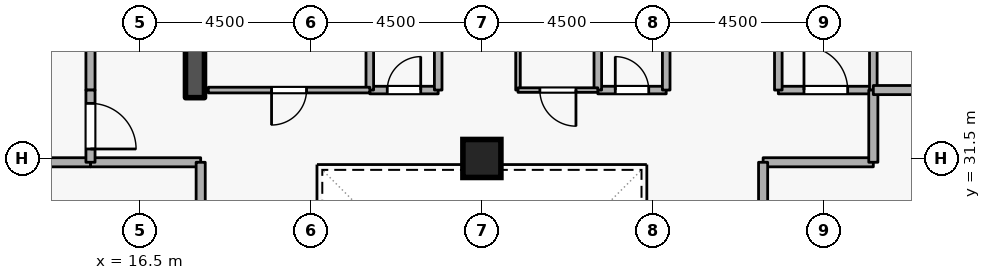
"""IFC4 building model, lengths in metres.
Left out: names, types, materials, properties, quantities, classifications, styles, units other than length and angle.
Written with IfcOpenShell. Run it as: python <this file> out.ifc"""

import sys

from ifc_helpers import new_model, si_unit, direction, frame, frame_2d, origin, origin_2d, place, context, subcontext, project, spatial, rectangle, extrude, element, fill, save


model = new_model("IFC4")
c1 = context("Model", 3, precision=1e-05, world=origin(), true_north=direction((0.0, 1.0)))
c2 = subcontext(c1, "Body", "Model", "MODEL_VIEW")
j1 = project(units=[si_unit("LENGTHUNIT", "METRE"), si_unit("PLANEANGLEUNIT", "RADIAN")], contexts=[c1])
p1 = place(None, origin())
s1 = spatial("IfcSite", under=j1, at=p1, CompositionType="ELEMENT")
p2 = place(p1, origin())
s2 = spatial("IfcBuilding", under=s1, at=p2, CompositionType="ELEMENT")
p3 = place(p2, frame((0.0, 0.0, 221.7)))
s3 = spatial("IfcBuildingStorey", under=s2, at=p3, CompositionType="ELEMENT", Elevation=221.7)
p4 = place(p3, frame((17.95, 33.1, 0.0), z_axis=(0.0, 0.0, 1.0), x_axis=(0.0, 1.0, 0.0)))
e1 = element("IfcWall", 1, at=p4, inside=s3, PredefinedType="SHEAR", context=c2, shape_type="SweptSolid", body=[
    extrude(rectangle(XDim=5.8, YDim=0.5, at=frame_2d((2.9, 0.0))), origin(), (0.0, 0.0, 1.0), 4.2),
])
p5 = place(p3, frame((25.5, 31.5, 0.0), z_axis=(0.0, 0.0, 1.0), x_axis=(1.0, 0.0, 0.0)))
e2 = element("IfcColumn", 2, at=p5, inside=s3, PredefinedType="COLUMN", context=c2, shape_type="SweptSolid", body=[
    extrude(rectangle(XDim=1.0, YDim=1.0, at=origin_2d()), origin(), (0.0, 0.0, 1.0), 4.2),
])
p6 = place(p3, frame((33.3, 33.3, 0.0), z_axis=(0.0, 0.0, 1.0), x_axis=(1.0, 0.0, 0.0)))
e3 = element("IfcWall", 3, at=p6, inside=s3, PredefinedType="STANDARD", context=c2, shape_type="SweptSolid", body=[
    extrude(rectangle(XDim=2.5, YDim=0.2, at=frame_2d((1.25, 0.0))), origin(), (0.0, 0.0, 1.0), 3.94),
])
p7 = place(p6, frame((0.675, 0.0, 0.0)))
e4 = element("IfcOpeningElement", 4, at=p7, cuts=e3, PredefinedType="OPENING", context=c2, shape_type="SweptSolid", body=[
    extrude(rectangle(XDim=1.15, YDim=2.1, at=frame_2d((0.575, 1.05))), frame((0.0, 0.11, 0.0), z_axis=(0.0, -1.0, 0.0), x_axis=(1.0, 0.0, 0.0)), (0.0, 0.0, 1.0), 0.22),
])
p8 = place(p3, frame((35.8, 33.3, 0.0), z_axis=(0.0, 0.0, 1.0), x_axis=(0.0, 1.0, 0.0)))
e5 = element("IfcWall", 5, at=p8, inside=s3, PredefinedType="STANDARD", context=c2, shape_type="SweptSolid", body=[
    extrude(rectangle(XDim=5.7, YDim=0.2, at=frame_2d((2.85, 0.0))), origin(), (0.0, 0.0, 1.0), 3.94),
])
p9 = place(p8, frame((2.275, 0.0, 0.0)))
e6 = element("IfcOpeningElement", 6, at=p9, cuts=e5, PredefinedType="OPENING", context=c2, shape_type="SweptSolid", body=[
    extrude(rectangle(XDim=1.15, YDim=2.1, at=frame_2d((0.575, 1.05))), frame((0.0, 0.11, 0.0), z_axis=(0.0, -1.0, 0.0), x_axis=(1.0, 0.0, 0.0)), (0.0, 0.0, 1.0), 0.22),
])
p10 = place(p3, frame((33.3, 35.6, 0.0), z_axis=(0.0, 0.0, 1.0), x_axis=(0.0, -1.0, 0.0)))
e7 = element("IfcWall", 7, at=p10, inside=s3, PredefinedType="STANDARD", context=c2, shape_type="SweptSolid", body=[
    extrude(rectangle(XDim=2.3, YDim=0.2, at=frame_2d((1.15, 0.0))), origin(), (0.0, 0.0, 1.0), 3.145),
])
p11 = place(p3, frame((22.55, 33.3, 0.0), z_axis=(0.0, 0.0, 1.0), x_axis=(1.0, 0.0, 0.0)))
e8 = element("IfcWall", 8, at=p11, inside=s3, PredefinedType="STANDARD", context=c2, shape_type="SweptSolid", body=[
    extrude(rectangle(XDim=1.8, YDim=0.2, at=frame_2d((0.9, 0.0))), origin(), (0.0, 0.0, 1.0), 3.94),
])
p12 = place(p11, frame((0.46, 0.0, 0.0)))
e9 = element("IfcOpeningElement", 9, at=p12, cuts=e8, PredefinedType="OPENING", context=c2, shape_type="SweptSolid", body=[
    extrude(rectangle(XDim=0.88, YDim=2.04, at=frame_2d((0.44, 1.02))), frame((0.0, 0.11, 0.0), z_axis=(0.0, -1.0, 0.0), x_axis=(1.0, 0.0, 0.0)), (0.0, 0.0, 1.0), 0.22),
])
for number, where, z_axis, x_axis in (
    (10, (24.35, 33.3, 0.0), (0.0, 0.0, 1.0), (0.0, 1.0, 0.0)),
    (11, (22.55, 35.35, 0.0), (0.0, 0.0, 1.0), (0.0, -1.0, 0.0)),
):
    element("IfcWall", number, at=place(p3, frame(where, z_axis=z_axis, x_axis=x_axis)), inside=s3, PredefinedType="STANDARD", context=c2, shape_type="SweptSolid", body=[
        extrude(rectangle(XDim=2.05, YDim=0.2, at=frame_2d((1.025, 0.0))), origin(), (0.0, 0.0, 1.0), 3.94),
    ])
p13 = place(p3, frame((28.55, 33.3, 0.0), z_axis=(0.0, 0.0, 1.0), x_axis=(1.0, 0.0, 0.0)))
e12 = element("IfcWall", 12, at=p13, inside=s3, PredefinedType="STANDARD", context=c2, shape_type="SweptSolid", body=[
    extrude(rectangle(XDim=1.8, YDim=0.2, at=frame_2d((0.9, 0.0))), origin(), (0.0, 0.0, 1.0), 3.94),
])
p14 = place(p13, frame((0.46, 0.0, 0.0)))
e13 = element("IfcOpeningElement", 13, at=p14, cuts=e12, PredefinedType="OPENING", context=c2, shape_type="SweptSolid", body=[
    extrude(rectangle(XDim=0.88, YDim=2.04, at=frame_2d((0.44, 1.02))), frame((0.0, 0.11, 0.0), z_axis=(0.0, -1.0, 0.0), x_axis=(1.0, 0.0, 0.0)), (0.0, 0.0, 1.0), 0.22),
])
for number, where, z_axis, x_axis in (
    (14, (30.35, 33.3, 0.0), (0.0, 0.0, 1.0), (0.0, 1.0, 0.0)),
    (15, (28.55, 35.35, 0.0), (0.0, 0.0, 1.0), (0.0, -1.0, 0.0)),
):
    element("IfcWall", number, at=place(p3, frame(where, z_axis=z_axis, x_axis=x_axis)), inside=s3, PredefinedType="STANDARD", context=c2, shape_type="SweptSolid", body=[
        extrude(rectangle(XDim=2.05, YDim=0.2, at=frame_2d((1.025, 0.0))), origin(), (0.0, 0.0, 1.0), 3.94),
    ])
p15 = place(p3, frame((32.9, 31.4, 0.0), z_axis=(0.0, 0.0, 1.0), x_axis=(1.0, 0.0, 0.0)))
e16 = element("IfcWall", 16, at=p15, inside=s3, PredefinedType="STANDARD", context=c2, shape_type="SweptSolid", body=[
    extrude(rectangle(XDim=2.9, YDim=0.24, at=frame_2d((1.45, 0.0))), origin(), (0.0, 0.0, 1.0), 3.94),
])
p16 = place(p3, frame((35.8, 31.4, 0.0), z_axis=(0.0, 0.0, 1.0), x_axis=(0.0, 1.0, 0.0)))
e17 = element("IfcWall", 17, at=p16, inside=s3, PredefinedType="STANDARD", context=c2, shape_type="SweptSolid", body=[
    extrude(rectangle(XDim=1.9, YDim=0.24, at=frame_2d((0.95, 0.0))), origin(), (0.0, 0.0, 1.0), 3.94),
])
p17 = place(p3, frame((35.8, 33.3, 0.0), z_axis=(0.0, 0.0, 1.0), x_axis=(1.0, 0.0, 0.0)))
e18 = element("IfcWall", 18, at=p17, inside=s3, PredefinedType="STANDARD", context=c2, shape_type="SweptSolid", body=[
    extrude(rectangle(XDim=3.75, YDim=0.24, at=frame_2d((1.875, 0.0))), origin(), (0.0, 0.0, 1.0), 3.94),
])
p18 = place(p3, frame((32.9, 29.38, 0.0), z_axis=(0.0, 0.0, 1.0), x_axis=(0.0, 1.0, 0.0)))
e19 = element("IfcWall", 19, at=p18, inside=s3, PredefinedType="STANDARD", context=c2, shape_type="SweptSolid", body=[
    extrude(rectangle(XDim=2.02, YDim=0.24, at=frame_2d((1.01, 0.0))), origin(), (0.0, 0.0, 1.0), 3.145),
])
p19 = place(p3, frame((15.2, 31.4, 0.0), z_axis=(0.0, 0.0, 1.0), x_axis=(1.0, 0.0, 0.0)))
e20 = element("IfcWall", 20, at=p19, inside=s3, PredefinedType="STANDARD", context=c2, shape_type="SweptSolid", body=[
    extrude(rectangle(XDim=2.9, YDim=0.24, at=frame_2d((1.45, 0.0))), origin(), (0.0, 0.0, 1.0), 3.94),
])
p20 = place(p3, frame((18.1, 31.4, 0.0), z_axis=(0.0, 0.0, 1.0), x_axis=(0.0, -1.0, 0.0)))
e21 = element("IfcWall", 21, at=p20, inside=s3, PredefinedType="STANDARD", context=c2, shape_type="SweptSolid", body=[
    extrude(rectangle(XDim=4.4, YDim=0.24, at=frame_2d((2.2, 0.0))), origin(), (0.0, 0.0, 1.0), 3.145),
])
p21 = place(p20, frame((1.6, 0.0, 0.0)))
e22 = element("IfcOpeningElement", 22, at=p21, cuts=e21, PredefinedType="OPENING", context=c2, shape_type="SweptSolid", body=[
    extrude(rectangle(XDim=1.2, YDim=2.1, at=frame_2d((0.6, 1.05))), frame((0.0, 0.13, 0.0), z_axis=(0.0, -1.0, 0.0), x_axis=(1.0, 0.0, 0.0)), (0.0, 0.0, 1.0), 0.26),
])
p22 = place(p3, frame((5.5, 31.4, 0.0), z_axis=(0.0, 0.0, 1.0), x_axis=(1.0, 0.0, 0.0)))
e23 = element("IfcWall", 23, at=p22, inside=s3, PredefinedType="STANDARD", context=c2, shape_type="SweptSolid", body=[
    extrude(rectangle(XDim=9.7, YDim=0.24, at=frame_2d((4.85, 0.0))), origin(), (0.0, 0.0, 1.0), 3.94),
])
p23 = place(p3, frame((15.2, 38.8, 0.0), z_axis=(0.0, 0.0, 1.0), x_axis=(0.0, -1.0, 0.0)))
e24 = element("IfcWall", 24, at=p23, inside=s3, PredefinedType="STANDARD", context=c2, shape_type="SweptSolid", body=[
    extrude(rectangle(XDim=5.5, YDim=0.24, at=frame_2d((2.75, 0.0))), origin(), (0.0, 0.0, 1.0), 3.94),
])
p24 = place(p3, frame((15.2, 33.3, 0.0), z_axis=(0.0, 0.0, 1.0), x_axis=(0.0, -1.0, 0.0)))
e25 = element("IfcWall", 25, at=p24, inside=s3, PredefinedType="STANDARD", context=c2, shape_type="SweptSolid", body=[
    extrude(rectangle(XDim=1.9, YDim=0.24, at=frame_2d((0.95, 0.0))), origin(), (0.0, 0.0, 1.0), 3.94),
])
p25 = place(p24, frame((0.35, 0.0, 0.0)))
e26 = element("IfcOpeningElement", 26, at=p25, cuts=e25, PredefinedType="OPENING", context=c2, shape_type="SweptSolid", body=[
    extrude(rectangle(XDim=1.2, YDim=2.1, at=frame_2d((0.6, 1.05))), frame((0.0, 0.13, 0.0), z_axis=(0.0, -1.0, 0.0), x_axis=(1.0, 0.0, 0.0)), (0.0, 0.0, 1.0), 0.26),
])
p26 = place(p3, frame((22.55, 33.3, 0.0), z_axis=(0.0, 0.0, 1.0), x_axis=(-1.0, 0.0, 0.0)))
e27 = element("IfcWall", 27, at=p26, inside=s3, PredefinedType="PARTITIONING", context=c2, shape_type="SweptSolid", body=[
    extrude(rectangle(XDim=4.25, YDim=0.15, at=frame_2d((2.125, 0.0))), origin(), (0.0, 0.0, 1.0), 3.94),
])
p27 = place(p26, frame((1.665, 0.0, 0.0)))
e28 = element("IfcOpeningElement", 28, at=p27, cuts=e27, PredefinedType="OPENING", context=c2, shape_type="SweptSolid", body=[
    extrude(rectangle(XDim=0.92, YDim=2.08, at=frame_2d((0.46, 1.04))), frame((0.0, 0.085, 0.0), z_axis=(0.0, -1.0, 0.0), x_axis=(1.0, 0.0, 0.0)), (0.0, 0.0, 1.0), 0.17),
])
p28 = place(p3, frame((26.45, 33.3, 0.0), z_axis=(0.0, 0.0, 1.0), x_axis=(0.0, 1.0, 0.0)))
e29 = element("IfcWall", 29, at=p28, inside=s3, PredefinedType="PARTITIONING", context=c2, shape_type="SweptSolid", body=[
    extrude(rectangle(XDim=2.05, YDim=0.12, at=frame_2d((1.025, 0.0))), origin(), (0.0, 0.0, 1.0), 3.94),
])
p29 = place(p3, frame((28.55, 33.3, 0.0), z_axis=(0.0, 0.0, 1.0), x_axis=(-1.0, 0.0, 0.0)))
e30 = element("IfcWall", 30, at=p29, inside=s3, PredefinedType="PARTITIONING", context=c2, shape_type="SweptSolid", body=[
    extrude(rectangle(XDim=2.1, YDim=0.12, at=frame_2d((1.05, 0.0))), origin(), (0.0, 0.0, 1.0), 3.94),
])
p30 = place(p29, frame((0.575, 0.0, 0.0)))
e31 = element("IfcOpeningElement", 31, at=p30, cuts=e30, PredefinedType="OPENING", context=c2, shape_type="SweptSolid", body=[
    extrude(rectangle(XDim=0.95, YDim=2.1, at=frame_2d((0.475, 1.05))), frame((0.0, 0.07, 0.0), z_axis=(0.0, -1.0, 0.0), x_axis=(1.0, 0.0, 0.0)), (0.0, 0.0, 1.0), 0.14),
])
p31 = place(p7, origin())
e32 = element("IfcDoor", 32, at=p31, inside=s3, OperationType="SINGLE_SWING_LEFT", PredefinedType="DOOR", context=c2, shape_type="SweptSolid", body=[
    extrude(rectangle(XDim=1.15, YDim=2.1, at=frame_2d((0.575, 1.05))), frame((0.0, 0.025, 0.0), z_axis=(0.0, -1.0, 0.0), x_axis=(1.0, 0.0, 0.0)), (0.0, 0.0, 1.0), 0.05),
])
fill(e4, e32)
p32 = place(p12, origin())
e33 = element("IfcDoor", 33, at=p32, inside=s3, OperationType="SINGLE_SWING_RIGHT", PredefinedType="DOOR", context=c2, shape_type="SweptSolid", body=[
    extrude(rectangle(XDim=0.88, YDim=2.04, at=frame_2d((0.44, 1.02))), frame((0.0, 0.025, 0.0), z_axis=(0.0, -1.0, 0.0), x_axis=(1.0, 0.0, 0.0)), (0.0, 0.0, 1.0), 0.05),
])
fill(e9, e33)
p33 = place(p14, origin())
e34 = element("IfcDoor", 34, at=p33, inside=s3, OperationType="SINGLE_SWING_LEFT", PredefinedType="DOOR", context=c2, shape_type="SweptSolid", body=[
    extrude(rectangle(XDim=0.88, YDim=2.04, at=frame_2d((0.44, 1.02))), frame((0.0, 0.025, 0.0), z_axis=(0.0, -1.0, 0.0), x_axis=(1.0, 0.0, 0.0)), (0.0, 0.0, 1.0), 0.05),
])
fill(e13, e34)
p34 = place(p27, origin())
e35 = element("IfcDoor", 35, at=p34, inside=s3, OperationType="SINGLE_SWING_RIGHT", PredefinedType="DOOR", context=c2, shape_type="SweptSolid", body=[
    extrude(rectangle(XDim=0.92, YDim=2.08, at=frame_2d((0.46, 1.04))), frame((0.0, 0.025, 0.0), z_axis=(0.0, -1.0, 0.0), x_axis=(1.0, 0.0, 0.0)), (0.0, 0.0, 1.0), 0.05),
])
fill(e28, e35)
p35 = place(p30, origin())
e36 = element("IfcDoor", 36, at=p35, inside=s3, OperationType="SINGLE_SWING_LEFT", PredefinedType="DOOR", context=c2, shape_type="SweptSolid", body=[
    extrude(rectangle(XDim=0.95, YDim=2.1, at=frame_2d((0.475, 1.05))), frame((0.0, 0.025, 0.0), z_axis=(0.0, -1.0, 0.0), x_axis=(1.0, 0.0, 0.0)), (0.0, 0.0, 1.0), 0.05),
])
fill(e31, e36)
p36 = place(p25, origin())
e37 = element("IfcDoor", 37, at=p36, inside=s3, OperationType="SINGLE_SWING_RIGHT", PredefinedType="DOOR", context=c2, shape_type="SweptSolid", body=[
    extrude(rectangle(XDim=1.2, YDim=2.1, at=frame_2d((0.6, 1.05))), frame((0.0, 0.025, 0.0), z_axis=(0.0, -1.0, 0.0), x_axis=(1.0, 0.0, 0.0)), (0.0, 0.0, 1.0), 0.05),
])
fill(e26, e37)
save(model, sys.argv[1])
